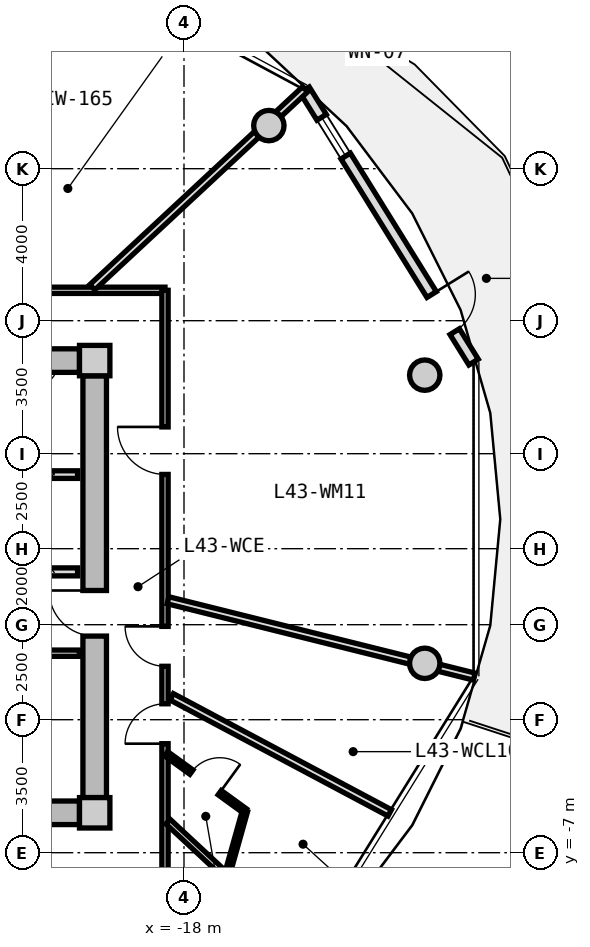
"""IFC4 building model, lengths in metres.
Left out: names, types, materials, properties, quantities, classifications, styles, units other than length and angle.
Written with IfcOpenShell. Run it as: python <this file> out.ifc"""

import sys

from ifc_helpers import new_model, si_unit, direction, frame, frame_2d, origin, origin_2d, place, context, subcontext, project, spatial, rectangle, circle, extrude, source, transform, mapped, element, fill, save


model = new_model("IFC4")
c1 = context("Model", 3, precision=1e-05, world=origin(), true_north=direction((0.0, 1.0)))
c2 = subcontext(c1, "Body", "Model", "MODEL_VIEW")
j1 = project(units=[si_unit("LENGTHUNIT", "METRE"), si_unit("PLANEANGLEUNIT", "RADIAN")], contexts=[c1])
p1 = place(None, origin())
s1 = spatial("IfcSite", under=j1, at=p1, CompositionType="ELEMENT")
p2 = place(p1, origin())
s2 = spatial("IfcBuilding", under=s1, at=p2, CompositionType="ELEMENT")
p3 = place(p2, frame((0.0, 0.0, 140.4)))
s3 = spatial("IfcBuildingStorey", under=s2, at=p3, CompositionType="ELEMENT", Elevation=140.4)
m1 = source(origin(), c2, "Body", "SweptSolid", [
    extrude(rectangle(XDim=0.8, YDim=0.8, at=origin_2d()), origin(), (0.0, 0.0, 1.0), 3.05),
])
for number, where, z_axis, x_axis in (
    (1, (-20.35, -5.95, 0.0), (0.0, 0.0, 1.0), (1.0, 0.0, 0.0)),
    (2, (-20.35, 5.95, 0.0), (0.0, 0.0, 1.0), (1.0, 0.0, 0.0)),
):
    element("IfcColumn", number, at=place(p3, frame(where, z_axis=z_axis, x_axis=x_axis)), inside=s3, PredefinedType="COLUMN", context=c2, shape_type="MappedRepresentation", body=[
        mapped(m1, transform((0.0, 0.0, 0.0), x_axis=(1.0, 0.0, 0.0), y_axis=(0.0, 1.0, 0.0), z_axis=(0.0, 0.0, 1.0), scale=1.0)),
    ])
m2 = source(origin(), c2, "Body", "SweptSolid", [
    extrude(rectangle(XDim=14.5, YDim=0.62, at=frame_2d((7.25, 0.0))), origin(), (0.0, 0.0, 1.0), 2.81),
])
for number, where, z_axis, x_axis in (
    (3, (-35.25, 5.95, 0.0), (0.0, 0.0, 1.0), (1.0, 0.0, 0.0)),
    (4, (-20.75, -5.95, 0.0), (0.0, 0.0, 1.0), (-1.0, 0.0, 0.0)),
):
    element("IfcWall", number, at=place(p3, frame(where, z_axis=z_axis, x_axis=x_axis)), inside=s3, PredefinedType="SHEAR", context=c2, shape_type="MappedRepresentation", body=[
        mapped(m2, transform((0.0, 0.0, 0.0), x_axis=(1.0, 0.0, 0.0), y_axis=(0.0, 1.0, 0.0), z_axis=(0.0, 0.0, 1.0), scale=1.0)),
    ])
m3 = source(origin(), c2, "Body", "SweptSolid", [
    extrude(rectangle(XDim=11.1, YDim=0.62, at=frame_2d((5.55, 0.0))), origin(), (0.0, 0.0, 1.0), 2.81),
])
p4 = place(p3, frame((-20.35, 5.55, 0.0), z_axis=(0.0, 0.0, 1.0), x_axis=(0.0, -1.0, 0.0)))
e5 = element("IfcWall", 5, at=p4, inside=s3, PredefinedType="SHEAR", context=c2, shape_type="MappedRepresentation", body=[
    mapped(m3, transform((0.0, 0.0, 0.0), x_axis=(1.0, 0.0, 0.0), y_axis=(0.0, 1.0, 0.0), z_axis=(0.0, 0.0, 1.0), scale=1.0)),
])
p5 = place(p4, frame((5.65, 0.0, 0.0)))
e6 = element("IfcOpeningElement", 6, at=p5, cuts=e5, PredefinedType="OPENING", context=c2, shape_type="SweptSolid", body=[
    extrude(rectangle(XDim=1.2, YDim=2.15, at=frame_2d((0.6, 1.075))), frame((0.0, 0.32, 0.0), z_axis=(0.0, -1.0, 0.0), x_axis=(1.0, 0.0, 0.0)), (0.0, 0.0, 1.0), 0.64),
])
m4 = source(origin(), c2, "Body", "SweptSolid", [
    extrude(circle(Radius=0.4, at=origin_2d()), origin(), (0.0, 0.0, 1.0), 3.05),
])
for number, where, z_axis, x_axis in (
    (7, (-11.665, 5.567, 0.0), (0.0, 0.0, 1.0), (1.0, 0.0, 0.0)),
    (8, (-15.767, 12.135, 0.0), (0.0, 0.0, 1.0), (1.0, 0.0, 0.0)),
    (9, (-11.665, -2.016, 0.0), (0.0, 0.0, 1.0), (1.0, 0.0, 0.0)),
):
    element("IfcColumn", number, at=place(p3, frame(where, z_axis=z_axis, x_axis=x_axis)), inside=s3, PredefinedType="COLUMN", context=c2, shape_type="MappedRepresentation", body=[
        mapped(m4, transform((0.0, 0.0, 0.0), x_axis=(1.0, 0.0, 0.0), y_axis=(0.0, 1.0, 0.0), z_axis=(0.0, 0.0, 1.0), scale=1.0)),
    ])
m5 = source(origin(), c2, "Body", "SweptSolid", [
    extrude(rectangle(XDim=8.431, YDim=0.29, at=frame_2d((4.216, 0.0))), origin(), (0.0, 0.0, 1.0), 2.81),
])
p6 = place(p3, frame((-14.827, 13.075, 0.0), z_axis=(0.0, 0.0, 1.0), x_axis=(0.527377998418, -0.849630770855, 0.0)))
e10 = element("IfcWall", 10, at=p6, inside=s3, PredefinedType="SOLIDWALL", context=c2, shape_type="MappedRepresentation", body=[
    mapped(m5, transform((0.0, 0.0, 0.0), x_axis=(1.0, 0.0, 0.0), y_axis=(0.0, 1.0, 0.0), z_axis=(0.0, 0.0, 1.0), scale=1.0)),
])
p7 = place(p6, frame((6.34, 0.0, 0.0)))
e11 = element("IfcOpeningElement", 11, at=p7, cuts=e10, PredefinedType="OPENING", context=c2, shape_type="SweptSolid", body=[
    extrude(rectangle(XDim=1.15, YDim=2.25, at=frame_2d((0.575, 1.125))), frame((0.0, 0.155, 0.0), z_axis=(0.0, -1.0, 0.0), x_axis=(1.0, 0.0, 0.0)), (0.0, 0.0, 1.0), 0.31),
])
p8 = place(p6, frame((0.85, 0.0, 0.85)))
e12 = element("IfcOpeningElement", 12, at=p8, cuts=e10, PredefinedType="OPENING", context=c2, shape_type="SweptSolid", body=[
    extrude(rectangle(XDim=1.2, YDim=1.5, at=frame_2d((0.6, 0.75))), frame((0.0, 0.155, 0.0), z_axis=(0.0, -1.0, 0.0), x_axis=(1.0, 0.0, 0.0)), (0.0, 0.0, 1.0), 0.31),
])
m6 = source(origin(), c2, "Body", "SweptSolid", [
    extrude(rectangle(XDim=3.2, YDim=0.2, at=frame_2d((1.6, 0.0))), origin(), (0.0, 0.0, 1.0), 2.795),
])
p9 = place(p3, frame((-24.0, 2.95, 0.0), z_axis=(0.0, 0.0, 1.0), x_axis=(1.0, 0.0, 0.0)))
e13 = element("IfcWall", 13, at=p9, inside=s3, PredefinedType="PARTITIONING", context=c2, shape_type="MappedRepresentation", body=[
    mapped(m6, transform((0.0, 0.0, 0.0), x_axis=(1.0, 0.0, 0.0), y_axis=(0.0, 1.0, 0.0), z_axis=(0.0, 0.0, 1.0), scale=1.0)),
])
m7 = source(origin(), c2, "Body", "SweptSolid", [
    extrude(rectangle(XDim=6.66, YDim=0.21, at=frame_2d((3.33, 0.0))), origin(), (0.0, 0.0, 1.0), 2.795),
])
p10 = place(p3, frame((-27.46, 0.39, 0.0), z_axis=(0.0, 0.0, 1.0), x_axis=(1.0, 0.0, 0.0)))
e14 = element("IfcWall", 14, at=p10, inside=s3, PredefinedType="PARTITIONING", context=c2, shape_type="MappedRepresentation", body=[
    mapped(m7, transform((0.0, 0.0, 0.0), x_axis=(1.0, 0.0, 0.0), y_axis=(0.0, 1.0, 0.0), z_axis=(0.0, 0.0, 1.0), scale=1.0)),
])
p11 = place(p10, frame((1.0, 0.0, 0.0)))
e15 = element("IfcOpeningElement", 15, at=p11, cuts=e14, PredefinedType="OPENING", context=c2, shape_type="SweptSolid", body=[
    extrude(rectangle(XDim=1.2, YDim=2.15, at=frame_2d((0.6, 1.075))), frame((0.0, 0.115, 0.0), z_axis=(0.0, -1.0, 0.0), x_axis=(1.0, 0.0, 0.0)), (0.0, 0.0, 1.0), 0.23),
])
m8 = source(origin(), c2, "Body", "SweptSolid", [
    extrude(rectangle(XDim=2.7, YDim=0.165, at=frame_2d((1.35, 0.0))), origin(), (0.0, 0.0, 1.0), 2.795),
])
p12 = place(p3, frame((-23.45, -1.75, 0.0), z_axis=(0.0, 0.0, 1.0), x_axis=(1.0, 0.0, 0.0)))
e16 = element("IfcWall", 16, at=p12, inside=s3, PredefinedType="PARTITIONING", context=c2, shape_type="MappedRepresentation", body=[
    mapped(m8, transform((0.0, 0.0, 0.0), x_axis=(1.0, 0.0, 0.0), y_axis=(0.0, 1.0, 0.0), z_axis=(0.0, 0.0, 1.0), scale=1.0)),
])
p13 = place(p12, frame((0.85, 0.0, 0.0)))
e17 = element("IfcOpeningElement", 17, at=p13, cuts=e16, PredefinedType="OPENING", context=c2, shape_type="SweptSolid", body=[
    extrude(rectangle(XDim=0.925, YDim=2.1, at=frame_2d((0.462, 1.05))), frame((0.0, 0.093, 0.0), z_axis=(0.0, -1.0, 0.0), x_axis=(1.0, 0.0, 0.0)), (0.0, 0.0, 1.0), 0.185),
])
m9 = source(origin(), c2, "Body", "SweptSolid", [
    extrude(rectangle(XDim=8.6, YDim=0.165, at=frame_2d((4.3, 0.0))), origin(), (0.0, 0.0, 1.0), 2.795),
])
p14 = place(p3, frame((-27.1, 7.8, 0.0), z_axis=(0.0, 0.0, 1.0), x_axis=(1.0, 0.0, 0.0)))
e18 = element("IfcWall", 18, at=p14, inside=s3, PredefinedType="PARTITIONING", context=c2, shape_type="MappedRepresentation", body=[
    mapped(m9, transform((0.0, 0.0, 0.0), x_axis=(1.0, 0.0, 0.0), y_axis=(0.0, 1.0, 0.0), z_axis=(0.0, 0.0, 1.0), scale=1.0)),
])
p15 = place(p14, frame((3.688, 0.0, 0.0)))
e19 = element("IfcOpeningElement", 19, at=p15, cuts=e18, PredefinedType="OPENING", context=c2, shape_type="SweptSolid", body=[
    extrude(rectangle(XDim=1.25, YDim=2.2, at=frame_2d((0.625, 1.1))), frame((0.0, 0.093, 0.0), z_axis=(0.0, -1.0, 0.0), x_axis=(1.0, 0.0, 0.0)), (0.0, 0.0, 1.0), 0.185),
])
m10 = source(origin(), c2, "Body", "SweptSolid", [
    extrude(rectangle(XDim=15.6, YDim=0.165, at=frame_2d((7.8, 0.0))), origin(), (0.0, 0.0, 1.0), 2.795),
])
p16 = place(p3, frame((-18.5, 7.8, 0.0), z_axis=(0.0, 0.0, 1.0), x_axis=(0.0, -1.0, 0.0)))
e20 = element("IfcWall", 20, at=p16, inside=s3, PredefinedType="PARTITIONING", context=c2, shape_type="MappedRepresentation", body=[
    mapped(m10, transform((0.0, 0.0, 0.0), x_axis=(1.0, 0.0, 0.0), y_axis=(0.0, 1.0, 0.0), z_axis=(0.0, 0.0, 1.0), scale=1.0)),
])
p17 = place(p16, frame((10.881, 0.0, 0.0)))
e21 = element("IfcOpeningElement", 21, at=p17, cuts=e20, PredefinedType="OPENING", context=c2, shape_type="SweptSolid", body=[
    extrude(rectangle(XDim=1.05, YDim=2.15, at=frame_2d((0.525, 1.075))), frame((0.0, 0.093, 0.0), z_axis=(0.0, -1.0, 0.0), x_axis=(1.0, 0.0, 0.0)), (0.0, 0.0, 1.0), 0.185),
])
p18 = place(p16, frame((8.844, 0.0, 0.0)))
e22 = element("IfcOpeningElement", 22, at=p18, cuts=e20, PredefinedType="OPENING", context=c2, shape_type="SweptSolid", body=[
    extrude(rectangle(XDim=1.05, YDim=2.15, at=frame_2d((0.525, 1.075))), frame((0.0, 0.093, 0.0), z_axis=(0.0, -1.0, 0.0), x_axis=(1.0, 0.0, 0.0)), (0.0, 0.0, 1.0), 0.185),
])
p19 = place(p16, frame((3.596, 0.0, 0.0)))
e23 = element("IfcOpeningElement", 23, at=p19, cuts=e20, PredefinedType="OPENING", context=c2, shape_type="SweptSolid", body=[
    extrude(rectangle(XDim=1.25, YDim=2.2, at=frame_2d((0.625, 1.1))), frame((0.0, 0.093, 0.0), z_axis=(0.0, -1.0, 0.0), x_axis=(1.0, 0.0, 0.0)), (0.0, 0.0, 1.0), 0.185),
])
m11 = source(origin(), c2, "Body", "SweptSolid", [
    extrude(rectangle(XDim=4.927, YDim=0.165, at=frame_2d((2.463, 0.0))), origin(), (0.0, 0.0, 1.0), 2.345),
])
p20 = place(p3, frame((-18.42, -6.183, 0.0), z_axis=(0.0, 0.0, 1.0), x_axis=(0.732191335987, -0.681098999783, 0.0)))
e24 = element("IfcWall", 24, at=p20, inside=s3, PredefinedType="PARTITIONING", context=c2, shape_type="MappedRepresentation", body=[
    mapped(m11, transform((0.0, 0.0, 0.0), x_axis=(1.0, 0.0, 0.0), y_axis=(0.0, 1.0, 0.0), z_axis=(0.0, 0.0, 1.0), scale=1.0)),
])
m12 = source(origin(), c2, "Body", "SweptSolid", [
    extrude(rectangle(XDim=8.305, YDim=0.19, at=frame_2d((4.153, 0.0))), origin(), (0.0, 0.0, 1.0), 2.345),
])
p21 = place(p3, frame((-18.42, -0.357, 0.0), z_axis=(0.0, 0.0, 1.0), x_axis=(0.970309994378, -0.241864662175, 0.0)))
e25 = element("IfcWall", 25, at=p21, inside=s3, PredefinedType="PARTITIONING", context=c2, shape_type="MappedRepresentation", body=[
    mapped(m12, transform((0.0, 0.0, 0.0), x_axis=(1.0, 0.0, 0.0), y_axis=(0.0, 1.0, 0.0), z_axis=(0.0, 0.0, 1.0), scale=1.0)),
])
m13 = source(origin(), c2, "Body", "SweptSolid", [
    extrude(rectangle(XDim=6.499, YDim=0.19, at=frame_2d((3.25, 0.0))), origin(), (0.0, 0.0, 1.0), 2.795),
])
p22 = place(p3, frame((-18.324, -2.898, 0.0), z_axis=(0.0, 0.0, 1.0), x_axis=(0.882700013711, -0.469936895545, 0.0)))
e26 = element("IfcWall", 26, at=p22, inside=s3, PredefinedType="PARTITIONING", context=c2, shape_type="MappedRepresentation", body=[
    mapped(m13, transform((0.0, 0.0, 0.0), x_axis=(1.0, 0.0, 0.0), y_axis=(0.0, 1.0, 0.0), z_axis=(0.0, 0.0, 1.0), scale=1.0)),
])
m14 = source(origin(), c2, "Body", "SweptSolid", [
    extrude(rectangle(XDim=2.563, YDim=0.14, at=frame_2d((1.282, 0.0))), origin(), (0.0, 0.0, 1.0), 2.795),
])
p23 = place(p3, frame((-18.47, -4.397, 0.0), z_axis=(0.0, 0.0, 1.0), x_axis=(0.809308208957, -0.587384220859, 0.0)))
e27 = element("IfcWall", 27, at=p23, inside=s3, PredefinedType="PARTITIONING", context=c2, shape_type="MappedRepresentation", body=[
    mapped(m14, transform((0.0, 0.0, 0.0), x_axis=(1.0, 0.0, 0.0), y_axis=(0.0, 1.0, 0.0), z_axis=(0.0, 0.0, 1.0), scale=1.0)),
])
p24 = place(p23, frame((0.822, 0.0, 0.0)))
e28 = element("IfcOpeningElement", 28, at=p24, cuts=e27, PredefinedType="OPENING", context=c2, shape_type="SweptSolid", body=[
    extrude(rectangle(XDim=0.92, YDim=2.1, at=frame_2d((0.46, 1.05))), frame((0.0, 0.08, 0.0), z_axis=(0.0, -1.0, 0.0), x_axis=(1.0, 0.0, 0.0)), (0.0, 0.0, 1.0), 0.16),
])
m15 = source(origin(), c2, "Body", "SweptSolid", [
    extrude(rectangle(XDim=1.826, YDim=0.14, at=frame_2d((0.913, 0.0))), origin(), (0.0, 0.0, 1.0), 2.435),
])
p25 = place(p3, frame((-16.396, -5.903, 0.0), z_axis=(0.0, 0.0, 1.0), x_axis=(-0.270745576918, -0.962650940154, 0.0)))
e29 = element("IfcWall", 29, at=p25, inside=s3, PredefinedType="PARTITIONING", context=c2, shape_type="MappedRepresentation", body=[
    mapped(m15, transform((0.0, 0.0, 0.0), x_axis=(1.0, 0.0, 0.0), y_axis=(0.0, 1.0, 0.0), z_axis=(0.0, 0.0, 1.0), scale=1.0)),
])
m16 = source(origin(), c2, "Body", "SweptSolid", [
    extrude(rectangle(XDim=7.648, YDim=0.19, at=frame_2d((3.824, 0.0))), origin(), (0.0, 0.0, 1.0), 2.345),
])
p26 = place(p3, frame((-20.413, 7.88, 0.0), z_axis=(0.0, 0.0, 1.0), x_axis=(0.732182665826, 0.681108320213, 0.0)))
e30 = element("IfcWall", 30, at=p26, inside=s3, PredefinedType="PARTITIONING", context=c2, shape_type="MappedRepresentation", body=[
    mapped(m16, transform((0.0, 0.0, 0.0), x_axis=(1.0, 0.0, 0.0), y_axis=(0.0, 1.0, 0.0), z_axis=(0.0, 0.0, 1.0), scale=1.0)),
])
m17 = source(origin(), c2, "Body", "SweptSolid", [
    extrude(rectangle(XDim=1.15, YDim=2.25, at=frame_2d((0.575, 1.125))), frame((0.0, 0.025, 0.0), z_axis=(0.0, -1.0, 0.0), x_axis=(1.0, 0.0, 0.0)), (0.0, 0.0, 1.0), 0.05),
])
p27 = place(p7, origin())
e31 = element("IfcDoor", 31, at=p27, inside=s3, OperationType="SINGLE_SWING_LEFT", PredefinedType="DOOR", context=c2, shape_type="MappedRepresentation", body=[
    mapped(m17, transform((0.0, 0.0, 0.0), x_axis=(1.0, 0.0, 0.0), y_axis=(0.0, 1.0, 0.0), z_axis=(0.0, 0.0, 1.0), scale=1.0)),
])
fill(e11, e31)
m18 = source(origin(), c2, "Body", "SweptSolid", [
    extrude(rectangle(XDim=1.2, YDim=1.5, at=frame_2d((0.6, 0.75))), frame((0.0, 0.03, 0.0), z_axis=(0.0, -1.0, 0.0), x_axis=(1.0, 0.0, 0.0)), (0.0, 0.0, 1.0), 0.06),
])
p28 = place(p8, origin())
e32 = element("IfcWindow", 32, at=p28, inside=s3, PartitioningType="SINGLE_PANEL", PredefinedType="WINDOW", context=c2, shape_type="MappedRepresentation", body=[
    mapped(m18, transform((0.0, 0.0, 0.0), x_axis=(1.0, 0.0, 0.0), y_axis=(0.0, 1.0, 0.0), z_axis=(0.0, 0.0, 1.0), scale=1.0)),
])
fill(e12, e32)
m19 = source(origin(), c2, "Body", "SweptSolid", [
    extrude(rectangle(XDim=1.2, YDim=2.15, at=frame_2d((0.6, 1.075))), frame((0.0, 0.025, 0.0), z_axis=(0.0, -1.0, 0.0), x_axis=(1.0, 0.0, 0.0)), (0.0, 0.0, 1.0), 0.05),
])
p29 = place(p5, frame((1.2, 0.0, 0.0), z_axis=(0.0, 0.0, 1.0), x_axis=(-1.0, 0.0, 0.0)))
e33 = element("IfcDoor", 33, at=p29, inside=s3, OperationType="SINGLE_SWING_RIGHT", PredefinedType="DOOR", context=c2, shape_type="MappedRepresentation", body=[
    mapped(m19, transform((0.0, 0.0, 0.0), x_axis=(1.0, 0.0, 0.0), y_axis=(0.0, 1.0, 0.0), z_axis=(0.0, 0.0, 1.0), scale=1.0)),
])
fill(e6, e33)
m20 = source(origin(), c2, "Body", "SweptSolid", [
    extrude(rectangle(XDim=1.05, YDim=2.15, at=frame_2d((0.525, 1.075))), frame((0.0, 0.025, 0.0), z_axis=(0.0, -1.0, 0.0), x_axis=(1.0, 0.0, 0.0)), (0.0, 0.0, 1.0), 0.05),
])
p30 = place(p17, frame((1.05, 0.0, 0.0), z_axis=(0.0, 0.0, 1.0), x_axis=(-1.0, 0.0, 0.0)))
e34 = element("IfcDoor", 34, at=p30, inside=s3, OperationType="SINGLE_SWING_LEFT", PredefinedType="DOOR", context=c2, shape_type="MappedRepresentation", body=[
    mapped(m20, transform((0.0, 0.0, 0.0), x_axis=(1.0, 0.0, 0.0), y_axis=(0.0, 1.0, 0.0), z_axis=(0.0, 0.0, 1.0), scale=1.0)),
])
fill(e21, e34)
m21 = source(origin(), c2, "Body", "SweptSolid", [
    extrude(rectangle(XDim=0.92, YDim=2.1, at=frame_2d((0.46, 1.05))), frame((0.0, 0.025, 0.0), z_axis=(0.0, -1.0, 0.0), x_axis=(1.0, 0.0, 0.0)), (0.0, 0.0, 1.0), 0.05),
])
p31 = place(p24, origin())
e35 = element("IfcDoor", 35, at=p31, inside=s3, OperationType="SINGLE_SWING_RIGHT", PredefinedType="DOOR", context=c2, shape_type="MappedRepresentation", body=[
    mapped(m21, transform((0.0, 0.0, 0.0), x_axis=(1.0, 0.0, 0.0), y_axis=(0.0, 1.0, 0.0), z_axis=(0.0, 0.0, 1.0), scale=1.0)),
])
fill(e28, e35)
p32 = place(p18, frame((1.05, 0.0, 0.0), z_axis=(0.0, 0.0, 1.0), x_axis=(-1.0, 0.0, 0.0)))
e36 = element("IfcDoor", 36, at=p32, inside=s3, OperationType="SINGLE_SWING_RIGHT", PredefinedType="DOOR", context=c2, shape_type="MappedRepresentation", body=[
    mapped(m20, transform((0.0, 0.0, 0.0), x_axis=(1.0, 0.0, 0.0), y_axis=(0.0, 1.0, 0.0), z_axis=(0.0, 0.0, 1.0), scale=1.0)),
])
fill(e22, e36)
m22 = source(origin(), c2, "Body", "SweptSolid", [
    extrude(rectangle(XDim=1.25, YDim=2.2, at=frame_2d((0.625, 1.1))), frame((0.0, 0.025, 0.0), z_axis=(0.0, -1.0, 0.0), x_axis=(1.0, 0.0, 0.0)), (0.0, 0.0, 1.0), 0.05),
])
p33 = place(p19, frame((1.25, 0.0, 0.0), z_axis=(0.0, 0.0, 1.0), x_axis=(-1.0, 0.0, 0.0)))
e37 = element("IfcDoor", 37, at=p33, inside=s3, OperationType="SINGLE_SWING_RIGHT", PredefinedType="DOOR", context=c2, shape_type="MappedRepresentation", body=[
    mapped(m22, transform((0.0, 0.0, 0.0), x_axis=(1.0, 0.0, 0.0), y_axis=(0.0, 1.0, 0.0), z_axis=(0.0, 0.0, 1.0), scale=1.0)),
])
fill(e23, e37)
save(model, sys.argv[1])
